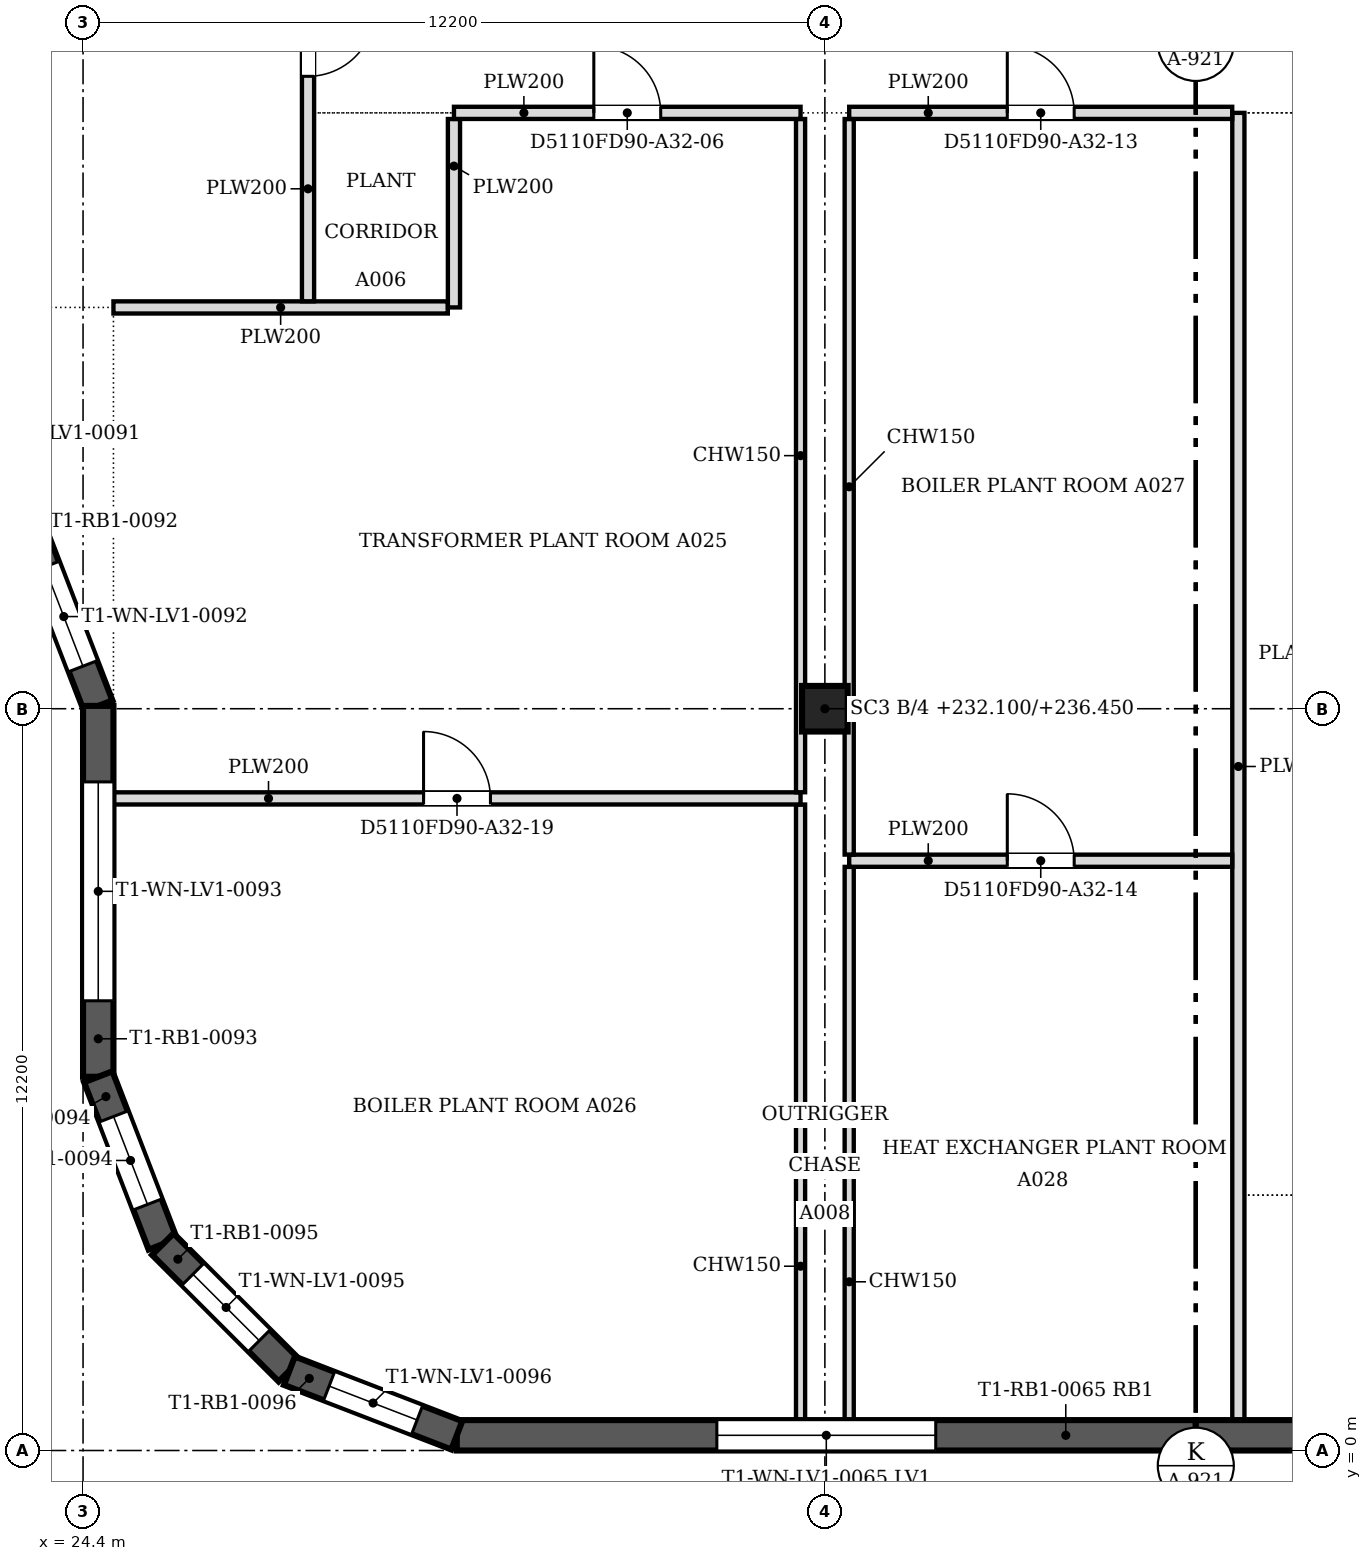
"""IFC4 building model, lengths in metres.
Left out: names, types, materials, properties, quantities, classifications, styles, units other than length and angle.
Written with IfcOpenShell. Run it as: python <this file> out.ifc"""

import sys

from ifc_helpers import new_model, si_unit, direction, frame, frame_2d, origin, origin_2d, place, context, subcontext, project, spatial, polyline, rectangle, outline, extrude, faceted_brep, source, transform, mapped, element, fill, save


model = new_model("IFC4")
c1 = context("Model", 3, precision=1e-05, world=origin(), true_north=direction((0.0, 1.0)))
c2 = subcontext(c1, "Body", "Model", "MODEL_VIEW")
j1 = project(units=[si_unit("LENGTHUNIT", "METRE"), si_unit("PLANEANGLEUNIT", "RADIAN")], contexts=[c1])
p1 = place(None, origin())
s1 = spatial("IfcSite", under=j1, at=p1, CompositionType="ELEMENT")
p2 = place(p1, origin())
s2 = spatial("IfcBuilding", under=s1, at=p2, CompositionType="ELEMENT")
p3 = place(p2, frame((0.0, 0.0, 232.1)))
s3 = spatial("IfcBuildingStorey", under=s2, at=p3, CompositionType="ELEMENT", Elevation=232.1)
p4 = place(p3, frame((36.6, 12.2, 0.0), z_axis=(0.0, 0.0, 1.0), x_axis=(1.0, 0.0, 0.0)))
e1 = element("IfcColumn", 1, at=p4, inside=s3, PredefinedType="COLUMN", context=c2, shape_type="SweptSolid", body=[
    extrude(rectangle(XDim=0.75, YDim=0.75, at=origin_2d()), origin(), (0.0, 0.0, 1.0), 4.35),
])
m1 = source(origin(), c2, "Body", "Brep", [
    faceted_brep([(0.0, -0.25, 0.0), (12.154, -0.25, 0.0), (12.154, -0.25, 4.8), (0.0, -0.25, 4.8), (0.047, 0.25, 4.8), (12.154, 0.25, 4.8), (12.154, 0.25, 0.0), (0.047, 0.25, 0.0), (0.0, 0.0, 0.0), (0.0, 0.0, 4.8)], [[[0, 1, 2, 3]], [[4, 5, 6, 7]], [[7, 6, 1, 0, 8]], [[5, 4, 9, 3, 2]], [[8, 0, 3, 9]], [[7, 8, 9, 4]], [[1, 6, 5, 2]]]),
])
p5 = place(p3, frame((30.547, 0.25, 0.0), z_axis=(0.0, 0.0, 1.0), x_axis=(1.0, 0.0, 0.0)))
e2 = element("IfcWall", 2, at=p5, inside=s3, PredefinedType="SOLIDWALL", context=c2, shape_type="MappedRepresentation", body=[
    mapped(m1, transform((0.0, 0.0, 0.0), scale=1.0)),
])
m2 = source(origin(), c2, "Body", "SweptSolid", [
    extrude(outline(polyline([(4.277, 0.8), (7.877, 0.8), (7.877, 4.0), (4.277, 4.0), (4.277, 0.8)])), frame((0.0, 0.26, 0.0), z_axis=(0.0, -1.0, 0.0), x_axis=(1.0, 0.0, 0.0)), (0.0, 0.0, 1.0), 0.52),
])
p6 = place(p5, origin())
e3 = element("IfcOpeningElement", 3, at=p6, cuts=e2, PredefinedType="OPENING", context=c2, shape_type="MappedRepresentation", body=[
    mapped(m2, transform((0.0, 0.0, 0.0), scale=1.0)),
])
m3 = source(origin(), c2, "Body", "Brep", [
    faceted_brep([(0.0, -0.25, 0.0), (12.154, -0.25, 0.0), (12.154, -0.25, 4.8), (0.0, -0.25, 4.8), (0.0, 0.25, 4.8), (12.107, 0.25, 4.8), (12.107, 0.25, 0.0), (0.0, 0.25, 0.0), (12.154, -0.0, 0.0), (12.154, -0.0, 4.8)], [[[0, 1, 2, 3]], [[4, 5, 6, 7]], [[7, 6, 8, 1, 0]], [[9, 2, 1, 8]], [[5, 4, 3, 2, 9]], [[4, 7, 0, 3]], [[8, 6, 5, 9]]]),
])
p7 = place(p3, frame((42.7, 0.25, 0.0), z_axis=(0.0, 0.0, 1.0), x_axis=(1.0, 0.0, 0.0)))
e4 = element("IfcWall", 4, at=p7, inside=s3, PredefinedType="SOLIDWALL", context=c2, shape_type="MappedRepresentation", body=[
    mapped(m3, transform((0.0, 0.0, 0.0), scale=1.0)),
])
p8 = place(p7, origin())
e5 = element("IfcOpeningElement", 5, at=p8, cuts=e4, PredefinedType="OPENING", context=c2, shape_type="MappedRepresentation", body=[
    mapped(m2, transform((0.0, 0.0, 0.0), scale=1.0)),
])
m4 = source(origin(), c2, "Body", "Brep", [
    faceted_brep([(0.053, -0.25, 0.0), (3.103, -0.25, 0.0), (3.103, -0.25, 4.8), (0.053, -0.25, 4.8), (0.0, 0.25, 4.8), (3.149, 0.25, 4.8), (3.149, 0.25, 0.0), (0.0, 0.25, 0.0), (3.149, -0.0, 0.0), (0.0, 0.0, 0.0), (3.149, -0.0, 4.8), (0.0, 0.0, 4.8)], [[[0, 1, 2, 3]], [[4, 5, 6, 7]], [[7, 6, 8, 1, 0, 9]], [[6, 5, 10, 8]], [[5, 4, 11, 3, 2, 10]], [[4, 7, 9, 11]], [[9, 0, 3, 11]], [[1, 8, 10, 2]]]),
])
p9 = place(p3, frame((23.517, 15.185, 0.0), z_axis=(0.0, 0.0, 1.0), x_axis=(0.359841220347, -0.933013556246, 0.0)))
e6 = element("IfcWall", 6, at=p9, inside=s3, PredefinedType="SOLIDWALL", context=c2, shape_type="MappedRepresentation", body=[
    mapped(m4, transform((0.0, 0.0, 0.0), scale=1.0)),
])
m5 = source(origin(), c2, "Body", "SweptSolid", [
    extrude(outline(polyline([(0.7, 0.8), (2.449, 0.8), (2.449, 4.0), (0.7, 4.0), (0.7, 0.8)])), frame((0.0, 0.26, 0.0), z_axis=(0.0, -1.0, 0.0), x_axis=(1.0, 0.0, 0.0)), (0.0, 0.0, 1.0), 0.52),
])
p10 = place(p9, origin())
e7 = element("IfcOpeningElement", 7, at=p10, cuts=e6, PredefinedType="OPENING", context=c2, shape_type="MappedRepresentation", body=[
    mapped(m5, transform((0.0, 0.0, 0.0), scale=1.0)),
])
m6 = source(origin(), c2, "Body", "Brep", [
    faceted_brep([(0.047, -0.25, 0.0), (6.1, -0.25, 0.0), (6.1, -0.25, 4.8), (0.047, -0.25, 4.8), (0.0, 0.25, 4.8), (6.053, 0.25, 4.8), (6.053, 0.25, 0.0), (0.0, 0.25, 0.0), (6.1, -0.0, 0.0), (0.0, 0.0, 0.0), (6.1, -0.0, 4.8), (0.0, 0.0, 4.8)], [[[0, 1, 2, 3]], [[4, 5, 6, 7]], [[7, 6, 8, 1, 0, 9]], [[10, 2, 1, 8]], [[5, 4, 11, 3, 2, 10]], [[4, 7, 9, 11]], [[9, 0, 3, 11]], [[8, 6, 5, 10]]]),
])
p11 = place(p3, frame((24.65, 12.247, 0.0), z_axis=(0.0, 0.0, 1.0), x_axis=(0.0, -1.0, 0.0)))
e8 = element("IfcWall", 8, at=p11, inside=s3, PredefinedType="SOLIDWALL", context=c2, shape_type="MappedRepresentation", body=[
    mapped(m6, transform((0.0, 0.0, 0.0), scale=1.0)),
])
m7 = source(origin(), c2, "Body", "SweptSolid", [
    extrude(outline(polyline([(1.25, 0.8), (4.85, 0.8), (4.85, 4.0), (1.25, 4.0), (1.25, 0.8)])), frame((0.0, 0.26, 0.0), z_axis=(0.0, -1.0, 0.0), x_axis=(1.0, 0.0, 0.0)), (0.0, 0.0, 1.0), 0.52),
])
p12 = place(p11, origin())
e9 = element("IfcOpeningElement", 9, at=p12, cuts=e8, PredefinedType="OPENING", context=c2, shape_type="MappedRepresentation", body=[
    mapped(m7, transform((0.0, 0.0, 0.0), scale=1.0)),
])
m8 = source(origin(), c2, "Body", "Brep", [
    faceted_brep([(0.0, -0.25, 0.0), (2.95, -0.25, 0.0), (2.95, -0.25, 4.8), (0.0, -0.25, 4.8), (0.047, 0.25, 4.8), (2.898, 0.25, 4.8), (2.898, 0.25, 0.0), (0.047, 0.25, 0.0), (2.95, 0.0, 0.0), (0.0, 0.0, 0.0), (2.95, 0.0, 4.8), (0.0, 0.0, 4.8)], [[[0, 1, 2, 3]], [[4, 5, 6, 7]], [[7, 6, 8, 1, 0, 9]], [[10, 2, 1, 8]], [[5, 4, 11, 3, 2, 10]], [[9, 0, 3, 11]], [[7, 9, 11, 4]], [[8, 6, 5, 10]]]),
])
p13 = place(p3, frame((24.65, 6.146, 0.0), z_axis=(0.0, 0.0, 1.0), x_axis=(0.359949242603, -0.932971887438, 0.0)))
e10 = element("IfcWall", 10, at=p13, inside=s3, PredefinedType="SOLIDWALL", context=c2, shape_type="MappedRepresentation", body=[
    mapped(m8, transform((0.0, 0.0, 0.0), scale=1.0)),
])
m9 = source(origin(), c2, "Body", "SweptSolid", [
    extrude(outline(polyline([(0.7, 0.8), (2.25, 0.8), (2.25, 4.0), (0.7, 4.0), (0.7, 0.8)])), frame((0.0, 0.26, 0.0), z_axis=(0.0, -1.0, 0.0), x_axis=(1.0, 0.0, 0.0)), (0.0, 0.0, 1.0), 0.52),
])
p14 = place(p13, origin())
e11 = element("IfcOpeningElement", 11, at=p14, cuts=e10, PredefinedType="OPENING", context=c2, shape_type="MappedRepresentation", body=[
    mapped(m9, transform((0.0, 0.0, 0.0), scale=1.0)),
])
m10 = source(origin(), c2, "Body", "Brep", [
    faceted_brep([(0.0, -0.25, 0.0), (2.944, -0.25, 0.0), (2.944, -0.25, 4.8), (0.0, -0.25, 4.8), (0.053, 0.25, 4.8), (2.891, 0.25, 4.8), (2.891, 0.25, 0.0), (0.053, 0.25, 0.0), (2.944, 0.0, 0.0), (0.0, 0.0, 0.0), (2.944, 0.0, 4.8), (0.0, 0.0, 4.8)], [[[0, 1, 2, 3]], [[4, 5, 6, 7]], [[7, 6, 8, 1, 0, 9]], [[10, 2, 1, 8]], [[5, 4, 11, 3, 2, 10]], [[9, 0, 3, 11]], [[7, 9, 11, 4]], [[8, 6, 5, 10]]]),
])
p15 = place(p3, frame((25.712, 3.394, 0.0), z_axis=(0.0, 0.0, 1.0), x_axis=(0.707106781187, -0.707106781187, 0.0)))
e12 = element("IfcWall", 12, at=p15, inside=s3, PredefinedType="SOLIDWALL", context=c2, shape_type="MappedRepresentation", body=[
    mapped(m10, transform((0.0, 0.0, 0.0), scale=1.0)),
])
m11 = source(origin(), c2, "Body", "SweptSolid", [
    extrude(outline(polyline([(0.7, 0.8), (2.244, 0.8), (2.244, 4.0), (0.7, 4.0), (0.7, 0.8)])), frame((0.0, 0.26, 0.0), z_axis=(0.0, -1.0, 0.0), x_axis=(1.0, 0.0, 0.0)), (0.0, 0.0, 1.0), 0.52),
])
p16 = place(p15, origin())
e13 = element("IfcOpeningElement", 13, at=p16, cuts=e12, PredefinedType="OPENING", context=c2, shape_type="MappedRepresentation", body=[
    mapped(m11, transform((0.0, 0.0, 0.0), scale=1.0)),
])
m12 = source(origin(), c2, "Body", "Brep", [
    faceted_brep([(0.0, -0.25, 0.0), (2.95, -0.25, 0.0), (2.95, -0.25, 4.8), (0.0, -0.25, 4.8), (0.053, 0.25, 4.8), (2.904, 0.25, 4.8), (2.904, 0.25, 0.0), (0.053, 0.25, 0.0), (2.95, 0.0, 0.0), (0.0, 0.0, 0.0), (2.95, 0.0, 4.8), (0.0, 0.0, 4.8)], [[[0, 1, 2, 3]], [[4, 5, 6, 7]], [[7, 6, 8, 1, 0, 9]], [[10, 2, 1, 8]], [[5, 4, 11, 3, 2, 10]], [[9, 0, 3, 11]], [[7, 9, 11, 4]], [[8, 6, 5, 10]]]),
])
p17 = place(p3, frame((27.794, 1.312, 0.0), z_axis=(0.0, 0.0, 1.0), x_axis=(0.932971887438, -0.359949242603, 0.0)))
e14 = element("IfcWall", 14, at=p17, inside=s3, PredefinedType="SOLIDWALL", context=c2, shape_type="MappedRepresentation", body=[
    mapped(m12, transform((0.0, 0.0, 0.0), scale=1.0)),
])
p18 = place(p17, origin())
e15 = element("IfcOpeningElement", 15, at=p18, cuts=e14, PredefinedType="OPENING", context=c2, shape_type="MappedRepresentation", body=[
    mapped(m9, transform((0.0, 0.0, 0.0), scale=1.0)),
])
p19 = place(p3, frame((36.2, 0.5, 0.0), z_axis=(0.0, 0.0, 1.0), x_axis=(0.0, 1.0, 0.0)))
e16 = element("IfcWall", 16, at=p19, inside=s3, PredefinedType="PARTITIONING", context=c2, shape_type="SweptSolid", body=[
    extrude(rectangle(XDim=10.124, YDim=0.15, at=frame_2d((5.062, 0.0))), origin(), (0.0, 0.0, 1.0), 3.817),
])
p20 = place(p3, frame((37.0, 0.5, 0.0), z_axis=(0.0, 0.0, 1.0), x_axis=(0.0, 1.0, 0.0)))
e17 = element("IfcWall", 17, at=p20, inside=s3, PredefinedType="PARTITIONING", context=c2, shape_type="SweptSolid", body=[
    extrude(rectangle(XDim=9.099, YDim=0.15, at=frame_2d((4.55, 0.0))), origin(), (0.0, 0.0, 1.0), 3.817),
])
p21 = place(p3, frame((43.4, 0.5, 0.0), z_axis=(0.0, 0.0, 1.0), x_axis=(0.0, 1.0, 0.0)))
e18 = element("IfcWall", 18, at=p21, inside=s3, PredefinedType="PARTITIONING", context=c2, shape_type="SweptSolid", body=[
    extrude(rectangle(XDim=21.5, YDim=0.2, at=frame_2d((10.75, 0.0))), origin(), (0.0, 0.0, 1.0), 3.817),
])
p22 = place(p3, frame((43.299, 9.7, 0.0), z_axis=(0.0, 0.0, 1.0), x_axis=(-1.0, 0.0, 0.0)))
e19 = element("IfcWall", 19, at=p22, inside=s3, PredefinedType="PARTITIONING", context=c2, shape_type="SweptSolid", body=[
    extrude(rectangle(XDim=6.299, YDim=0.2, at=frame_2d((3.149, 0.0))), origin(), (0.0, 0.0, 1.0), 3.817),
])
m13 = source(origin(), c2, "Body", "SweptSolid", [
    extrude(rectangle(XDim=1.1, YDim=2.1, at=frame_2d((0.55, 1.05))), frame((0.0, 0.11, 0.0), z_axis=(0.0, -1.0, 0.0), x_axis=(1.0, 0.0, 0.0)), (0.0, 0.0, 1.0), 0.22),
])
p23 = place(p22, frame((2.599, 0.0, 0.0)))
e20 = element("IfcOpeningElement", 20, at=p23, cuts=e19, PredefinedType="OPENING", context=c2, shape_type="MappedRepresentation", body=[
    mapped(m13, transform((0.0, 0.0, 0.0), scale=1.0)),
])
p24 = place(p3, frame((37.0, 9.801, 0.0), z_axis=(0.0, 0.0, 1.0), x_axis=(0.0, 1.0, 0.0)))
e21 = element("IfcWall", 21, at=p24, inside=s3, PredefinedType="PARTITIONING", context=c2, shape_type="SweptSolid", body=[
    extrude(rectangle(XDim=12.098, YDim=0.15, at=frame_2d((6.049, 0.0))), origin(), (0.0, 0.0, 1.0), 3.817),
])
p25 = place(p3, frame((36.2, 10.725, 0.0), z_axis=(0.0, 0.0, 1.0), x_axis=(-1.0, 0.0, 0.0)))
e22 = element("IfcWall", 22, at=p25, inside=s3, PredefinedType="PARTITIONING", context=c2, shape_type="SweptSolid", body=[
    extrude(rectangle(XDim=11.3, YDim=0.2, at=frame_2d((5.65, 0.0))), origin(), (0.0, 0.0, 1.0), 3.817),
])
p26 = place(p25, frame((5.1, 0.0, 0.0)))
e23 = element("IfcOpeningElement", 23, at=p26, cuts=e22, PredefinedType="OPENING", context=c2, shape_type="MappedRepresentation", body=[
    mapped(m13, transform((0.0, 0.0, 0.0), scale=1.0)),
])
p27 = place(p3, frame((36.2, 10.826, 0.0), z_axis=(0.0, 0.0, 1.0), x_axis=(0.0, 1.0, 0.0)))
e24 = element("IfcWall", 24, at=p27, inside=s3, PredefinedType="PARTITIONING", context=c2, shape_type="SweptSolid", body=[
    extrude(rectangle(XDim=11.073, YDim=0.15, at=frame_2d((5.537, 0.0))), origin(), (0.0, 0.0, 1.0), 3.817),
])
p28 = place(p3, frame((24.9, 18.8, 0.0), z_axis=(0.0, 0.0, 1.0), x_axis=(1.0, 0.0, 0.0)))
e25 = element("IfcWall", 25, at=p28, inside=s3, PredefinedType="PARTITIONING", context=c2, shape_type="SweptSolid", body=[
    extrude(rectangle(XDim=5.499, YDim=0.2, at=frame_2d((2.75, 0.0))), origin(), (0.0, 0.0, 1.0), 3.817),
])
p29 = place(p3, frame((30.5, 18.8, 0.0), z_axis=(0.0, 0.0, 1.0), x_axis=(0.0, 1.0, 0.0)))
e26 = element("IfcWall", 26, at=p29, inside=s3, PredefinedType="PARTITIONING", context=c2, shape_type="SweptSolid", body=[
    extrude(rectangle(XDim=3.099, YDim=0.2, at=frame_2d((1.549, 0.0))), origin(), (0.0, 0.0, 1.0), 3.817),
])
p30 = place(p3, frame((28.1, 18.901, 0.0), z_axis=(0.0, 0.0, 1.0), x_axis=(0.0, 1.0, 0.0)))
e27 = element("IfcWall", 27, at=p30, inside=s3, PredefinedType="PARTITIONING", context=c2, shape_type="SweptSolid", body=[
    extrude(rectangle(XDim=5.398, YDim=0.2, at=frame_2d((2.699, 0.0))), origin(), (0.0, 0.0, 1.0), 3.817),
])
p31 = place(p30, frame((3.7, 0.0, 0.0)))
e28 = element("IfcOpeningElement", 28, at=p31, cuts=e27, PredefinedType="OPENING", context=c2, shape_type="MappedRepresentation", body=[
    mapped(m13, transform((0.0, 0.0, 0.0), scale=1.0)),
])
p32 = place(p3, frame((36.2, 22.0, 0.0), z_axis=(0.0, 0.0, 1.0), x_axis=(-1.0, 0.0, 0.0)))
e29 = element("IfcWall", 29, at=p32, inside=s3, PredefinedType="PARTITIONING", context=c2, shape_type="SweptSolid", body=[
    extrude(rectangle(XDim=5.7, YDim=0.2, at=frame_2d((2.85, 0.0))), origin(), (0.0, 0.0, 1.0), 3.817),
])
p33 = place(p32, frame((2.3, 0.0, 0.0)))
e30 = element("IfcOpeningElement", 30, at=p33, cuts=e29, PredefinedType="OPENING", context=c2, shape_type="MappedRepresentation", body=[
    mapped(m13, transform((0.0, 0.0, 0.0), scale=1.0)),
])
p34 = place(p3, frame((43.299, 22.0, 0.0), z_axis=(0.0, 0.0, 1.0), x_axis=(-1.0, 0.0, 0.0)))
e31 = element("IfcWall", 31, at=p34, inside=s3, PredefinedType="PARTITIONING", context=c2, shape_type="SweptSolid", body=[
    extrude(rectangle(XDim=6.299, YDim=0.2, at=frame_2d((3.149, 0.0))), origin(), (0.0, 0.0, 1.0), 3.817),
])
p35 = place(p34, frame((2.599, 0.0, 0.0)))
e32 = element("IfcOpeningElement", 32, at=p35, cuts=e31, PredefinedType="OPENING", context=c2, shape_type="MappedRepresentation", body=[
    mapped(m13, transform((0.0, 0.0, 0.0), scale=1.0)),
])
m14 = source(origin(), c2, "Body", "SweptSolid", [
    extrude(outline(polyline([(4.277, 0.8), (7.877, 0.8), (7.877, 4.0), (4.277, 4.0), (4.277, 0.8)])), frame((0.0, 0.03, 0.0), z_axis=(0.0, -1.0, 0.0), x_axis=(1.0, 0.0, 0.0)), (0.0, 0.0, 1.0), 0.06),
])
p36 = place(p6, origin())
e33 = element("IfcWindow", 33, at=p36, inside=s3, PartitioningType="USERDEFINED", PredefinedType="WINDOW", context=c2, shape_type="MappedRepresentation", body=[
    mapped(m14, transform((0.0, 0.0, 0.0), scale=1.0)),
])
fill(e3, e33)
m15 = source(origin(), c2, "Body", "SweptSolid", [
    extrude(outline(polyline([(0.7, 0.8), (2.449, 0.8), (2.449, 4.0), (0.7, 4.0), (0.7, 0.8)])), frame((0.0, 0.03, 0.0), z_axis=(0.0, -1.0, 0.0), x_axis=(1.0, 0.0, 0.0)), (0.0, 0.0, 1.0), 0.06),
])
p37 = place(p10, origin())
e34 = element("IfcWindow", 34, at=p37, inside=s3, PartitioningType="USERDEFINED", PredefinedType="WINDOW", context=c2, shape_type="MappedRepresentation", body=[
    mapped(m15, transform((0.0, 0.0, 0.0), scale=1.0)),
])
fill(e7, e34)
m16 = source(origin(), c2, "Body", "SweptSolid", [
    extrude(outline(polyline([(1.25, 0.8), (4.85, 0.8), (4.85, 4.0), (1.25, 4.0), (1.25, 0.8)])), frame((0.0, 0.03, 0.0), z_axis=(0.0, -1.0, 0.0), x_axis=(1.0, 0.0, 0.0)), (0.0, 0.0, 1.0), 0.06),
])
p38 = place(p12, origin())
e35 = element("IfcWindow", 35, at=p38, inside=s3, PartitioningType="USERDEFINED", PredefinedType="WINDOW", context=c2, shape_type="MappedRepresentation", body=[
    mapped(m16, transform((0.0, 0.0, 0.0), scale=1.0)),
])
fill(e9, e35)
m17 = source(origin(), c2, "Body", "SweptSolid", [
    extrude(outline(polyline([(0.7, 0.8), (2.25, 0.8), (2.25, 4.0), (0.7, 4.0), (0.7, 0.8)])), frame((0.0, 0.03, 0.0), z_axis=(0.0, -1.0, 0.0), x_axis=(1.0, 0.0, 0.0)), (0.0, 0.0, 1.0), 0.06),
])
p39 = place(p14, origin())
e36 = element("IfcWindow", 36, at=p39, inside=s3, PartitioningType="USERDEFINED", PredefinedType="WINDOW", context=c2, shape_type="MappedRepresentation", body=[
    mapped(m17, transform((0.0, 0.0, 0.0), scale=1.0)),
])
fill(e11, e36)
m18 = source(origin(), c2, "Body", "SweptSolid", [
    extrude(outline(polyline([(0.7, 0.8), (2.244, 0.8), (2.244, 4.0), (0.7, 4.0), (0.7, 0.8)])), frame((0.0, 0.03, 0.0), z_axis=(0.0, -1.0, 0.0), x_axis=(1.0, 0.0, 0.0)), (0.0, 0.0, 1.0), 0.06),
])
p40 = place(p16, origin())
e37 = element("IfcWindow", 37, at=p40, inside=s3, PartitioningType="USERDEFINED", PredefinedType="WINDOW", context=c2, shape_type="MappedRepresentation", body=[
    mapped(m18, transform((0.0, 0.0, 0.0), scale=1.0)),
])
fill(e13, e37)
p41 = place(p18, origin())
e38 = element("IfcWindow", 38, at=p41, inside=s3, PartitioningType="USERDEFINED", PredefinedType="WINDOW", context=c2, shape_type="MappedRepresentation", body=[
    mapped(m17, transform((0.0, 0.0, 0.0), scale=1.0)),
])
fill(e15, e38)
m19 = source(origin(), c2, "Body", "SweptSolid", [
    extrude(rectangle(XDim=1.1, YDim=2.1, at=frame_2d((0.55, 1.05))), frame((0.0, 0.025, 0.0), z_axis=(0.0, -1.0, 0.0), x_axis=(1.0, 0.0, 0.0)), (0.0, 0.0, 1.0), 0.05),
])
p42 = place(p31, origin())
e39 = element("IfcDoor", 39, at=p42, inside=s3, OperationType="SINGLE_SWING_RIGHT", PredefinedType="DOOR", context=c2, shape_type="MappedRepresentation", body=[
    mapped(m19, transform((0.0, 0.0, 0.0), scale=1.0)),
])
fill(e28, e39)
p43 = place(p33, origin())
e40 = element("IfcDoor", 40, at=p43, inside=s3, OperationType="SINGLE_SWING_RIGHT", PredefinedType="DOOR", context=c2, shape_type="MappedRepresentation", body=[
    mapped(m19, transform((0.0, 0.0, 0.0), scale=1.0)),
])
fill(e30, e40)
p44 = place(p35, origin())
e41 = element("IfcDoor", 41, at=p44, inside=s3, OperationType="SINGLE_SWING_RIGHT", PredefinedType="DOOR", context=c2, shape_type="MappedRepresentation", body=[
    mapped(m19, transform((0.0, 0.0, 0.0), scale=1.0)),
])
fill(e32, e41)
p45 = place(p23, origin())
e42 = element("IfcDoor", 42, at=p45, inside=s3, OperationType="SINGLE_SWING_RIGHT", PredefinedType="DOOR", context=c2, shape_type="MappedRepresentation", body=[
    mapped(m19, transform((0.0, 0.0, 0.0), scale=1.0)),
])
fill(e20, e42)
p46 = place(p26, origin())
e43 = element("IfcDoor", 43, at=p46, inside=s3, OperationType="SINGLE_SWING_RIGHT", PredefinedType="DOOR", context=c2, shape_type="MappedRepresentation", body=[
    mapped(m19, transform((0.0, 0.0, 0.0), scale=1.0)),
])
fill(e23, e43)
save(model, sys.argv[1])
